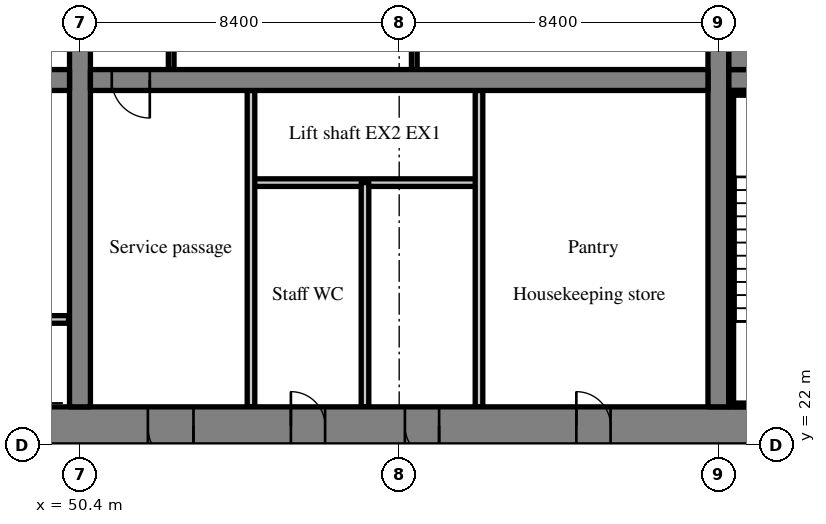
"""IFC4 building model, lengths in metres.
Left out: names, types, materials, properties, quantities, classifications, styles, units other than length and angle.
Written with IfcOpenShell. Run it as: python <this file> out.ifc"""

import sys

from ifc_helpers import new_model, si_unit, direction, frame, frame_2d, origin, place, context, subcontext, project, spatial, rectangle, extrude, source, transform, mapped, element, fill, save


model = new_model("IFC4")
c1 = context("Model", 3, precision=1e-05, world=origin(), true_north=direction((0.0, 1.0)))
c2 = subcontext(c1, "Body", "Model", "MODEL_VIEW")
j1 = project(units=[si_unit("LENGTHUNIT", "METRE"), si_unit("PLANEANGLEUNIT", "RADIAN")], contexts=[c1])
p1 = place(None, origin())
s1 = spatial("IfcSite", under=j1, at=p1, CompositionType="ELEMENT")
p2 = place(p1, origin())
s2 = spatial("IfcBuilding", under=s1, at=p2, CompositionType="ELEMENT")
p3 = place(p2, frame((0.0, 0.0, 50.6)))
s3 = spatial("IfcBuildingStorey", under=s2, at=p3, CompositionType="ELEMENT", Elevation=50.6)
m1 = source(origin(), c2, "Body", "SweptSolid", [
    extrude(rectangle(XDim=50.4, YDim=1.0, at=frame_2d((25.2, 0.0))), origin(), (0.0, 0.0, 1.0), 3.52),
])
p4 = place(p3, frame((25.2, 22.5, 0.0), z_axis=(0.0, 0.0, 1.0), x_axis=(1.0, 0.0, 0.0)))
e1 = element("IfcWall", 1, at=p4, inside=s3, PredefinedType="SHEAR", context=c2, shape_type="MappedRepresentation", body=[
    mapped(m1, transform((0.0, 0.0, 0.0), scale=1.0)),
])
m2 = source(origin(), c2, "Body", "SweptSolid", [
    extrude(rectangle(XDim=1.8, YDim=2.1, at=frame_2d((0.9, 1.05))), frame((0.0, 0.51, 0.0), z_axis=(0.0, -1.0, 0.0), x_axis=(1.0, 0.0, 0.0)), (0.0, 0.0, 1.0), 1.02),
])
p5 = place(p4, frame((15.9, 0.0, 0.0)))
e2 = element("IfcOpeningElement", 2, at=p5, cuts=e1, PredefinedType="OPENING", context=c2, shape_type="MappedRepresentation", body=[
    mapped(m2, transform((0.0, 0.0, 0.0), scale=1.0)),
])
m3 = source(origin(), c2, "Body", "SweptSolid", [
    extrude(rectangle(XDim=1.2, YDim=2.1, at=frame_2d((0.6, 1.05))), frame((0.0, 0.51, 0.0), z_axis=(0.0, -1.0, 0.0), x_axis=(1.0, 0.0, 0.0)), (0.0, 0.0, 1.0), 1.02),
])
p6 = place(p4, frame((26.987, 0.0, 0.0)))
e3 = element("IfcOpeningElement", 3, at=p6, cuts=e1, PredefinedType="OPENING", context=c2, shape_type="MappedRepresentation", body=[
    mapped(m3, transform((0.0, 0.0, 0.0), scale=1.0)),
])
m4 = source(origin(), c2, "Body", "SweptSolid", [
    extrude(rectangle(XDim=0.9, YDim=2.1, at=frame_2d((0.45, 1.05))), frame((0.0, 0.51, 0.0), z_axis=(0.0, -1.0, 0.0), x_axis=(1.0, 0.0, 0.0)), (0.0, 0.0, 1.0), 1.02),
])
p7 = place(p4, frame((33.75, 0.0, 0.0)))
e4 = element("IfcOpeningElement", 4, at=p7, cuts=e1, PredefinedType="OPENING", context=c2, shape_type="MappedRepresentation", body=[
    mapped(m4, transform((0.0, 0.0, 0.0), scale=1.0)),
])
p8 = place(p4, frame((30.75, 0.0, 0.0)))
e5 = element("IfcOpeningElement", 5, at=p8, cuts=e1, PredefinedType="OPENING", context=c2, shape_type="MappedRepresentation", body=[
    mapped(m4, transform((0.0, 0.0, 0.0), scale=1.0)),
])
p9 = place(p4, frame((38.262, 0.0, 0.0)))
e6 = element("IfcOpeningElement", 6, at=p9, cuts=e1, PredefinedType="OPENING", context=c2, shape_type="MappedRepresentation", body=[
    mapped(m4, transform((0.0, 0.0, 0.0), scale=1.0)),
])
p10 = place(p4, frame((6.438, 0.0, 0.0)))
e7 = element("IfcOpeningElement", 7, at=p10, cuts=e1, PredefinedType="OPENING", context=c2, shape_type="MappedRepresentation", body=[
    mapped(m3, transform((0.0, 0.0, 0.0), scale=1.0)),
])
p11 = place(p4, frame((47.725, 0.0, 0.0)))
e8 = element("IfcOpeningElement", 8, at=p11, cuts=e1, PredefinedType="OPENING", context=c2, shape_type="MappedRepresentation", body=[
    mapped(m3, transform((0.0, 0.0, 0.0), scale=1.0)),
])
m5 = source(origin(), c2, "Body", "SweptSolid", [
    extrude(rectangle(XDim=18.0, YDim=0.55, at=frame_2d((9.0, 0.0))), origin(), (0.0, 0.0, 1.0), 3.52),
])
p12 = place(p3, frame((50.4, 23.0, 0.0), z_axis=(0.0, 0.0, 1.0), x_axis=(0.0, 1.0, 0.0)))
e9 = element("IfcWall", 9, at=p12, inside=s3, PredefinedType="SHEAR", context=c2, shape_type="MappedRepresentation", body=[
    mapped(m5, transform((0.0, 0.0, 0.0), scale=1.0)),
])
m6 = source(origin(), c2, "Body", "SweptSolid", [
    extrude(rectangle(XDim=1.1, YDim=2.1, at=frame_2d((0.55, 1.05))), frame((0.0, 0.285, 0.0), z_axis=(0.0, -1.0, 0.0), x_axis=(1.0, 0.0, 0.0)), (0.0, 0.0, 1.0), 0.57),
])
p13 = place(p12, frame((12.45, 0.0, 0.0)))
e10 = element("IfcOpeningElement", 10, at=p13, cuts=e9, PredefinedType="OPENING", context=c2, shape_type="MappedRepresentation", body=[
    mapped(m6, transform((0.0, 0.0, 0.0), scale=1.0)),
])
p14 = place(p3, frame((67.2, 23.0, 0.0), z_axis=(0.0, 0.0, 1.0), x_axis=(0.0, 1.0, 0.0)))
e11 = element("IfcWall", 11, at=p14, inside=s3, PredefinedType="SHEAR", context=c2, shape_type="MappedRepresentation", body=[
    mapped(m5, transform((0.0, 0.0, 0.0), scale=1.0)),
])
m7 = source(origin(), c2, "Body", "SweptSolid", [
    extrude(rectangle(XDim=16.25, YDim=0.55, at=frame_2d((8.125, 0.0))), origin(), (0.0, 0.0, 1.0), 3.52),
])
p15 = place(p3, frame((33.875, 31.6, 0.0), z_axis=(0.0, 0.0, 1.0), x_axis=(1.0, 0.0, 0.0)))
e12 = element("IfcWall", 12, at=p15, inside=s3, PredefinedType="SHEAR", context=c2, shape_type="MappedRepresentation", body=[
    mapped(m7, transform((0.0, 0.0, 0.0), scale=1.0)),
])
m8 = source(origin(), c2, "Body", "SweptSolid", [
    extrude(rectangle(XDim=1.0, YDim=2.1, at=frame_2d((0.5, 1.05))), frame((0.0, 0.285, 0.0), z_axis=(0.0, -1.0, 0.0), x_axis=(1.0, 0.0, 0.0)), (0.0, 0.0, 1.0), 0.57),
])
p16 = place(p15, frame((14.687, 0.0, 0.0)))
e13 = element("IfcOpeningElement", 13, at=p16, cuts=e12, PredefinedType="OPENING", context=c2, shape_type="MappedRepresentation", body=[
    mapped(m8, transform((0.0, 0.0, 0.0), scale=1.0)),
])
p17 = place(p3, frame((50.675, 31.6, 0.0), z_axis=(0.0, 0.0, 1.0), x_axis=(1.0, 0.0, 0.0)))
e14 = element("IfcWall", 14, at=p17, inside=s3, PredefinedType="SHEAR", context=c2, shape_type="MappedRepresentation", body=[
    mapped(m7, transform((0.0, 0.0, 0.0), scale=1.0)),
])
p18 = place(p17, frame((0.562, 0.0, 0.0)))
e15 = element("IfcOpeningElement", 15, at=p18, cuts=e14, PredefinedType="OPENING", context=c2, shape_type="MappedRepresentation", body=[
    mapped(m8, transform((0.0, 0.0, 0.0), scale=1.0)),
])
m9 = source(origin(), c2, "Body", "SweptSolid", [
    extrude(rectangle(XDim=7.125, YDim=0.55, at=frame_2d((3.562, 0.0))), origin(), (0.0, 0.0, 1.0), 3.52),
])
p19 = place(p3, frame((67.475, 31.6, 0.0), z_axis=(0.0, 0.0, 1.0), x_axis=(1.0, 0.0, 0.0)))
e16 = element("IfcWall", 16, at=p19, inside=s3, PredefinedType="SHEAR", context=c2, shape_type="MappedRepresentation", body=[
    mapped(m9, transform((0.0, 0.0, 0.0), scale=1.0)),
])
p20 = place(p19, frame((5.5, 0.0, 0.0)))
e17 = element("IfcOpeningElement", 17, at=p20, cuts=e16, PredefinedType="OPENING", context=c2, shape_type="MappedRepresentation", body=[
    mapped(m6, transform((0.0, 0.0, 0.0), scale=1.0)),
])
m10 = source(origin(), c2, "Body", "SweptSolid", [
    extrude(rectangle(XDim=6.0, YDim=0.2, at=frame_2d((3.0, 0.0))), origin(), (0.0, 0.0, 1.0), 3.52),
])
p21 = place(p3, frame((44.1, 25.3, 0.0), z_axis=(0.0, 0.0, 1.0), x_axis=(1.0, 0.0, 0.0)))
e18 = element("IfcWall", 18, at=p21, inside=s3, PredefinedType="SOLIDWALL", context=c2, shape_type="MappedRepresentation", body=[
    mapped(m10, transform((0.0, 0.0, 0.0), scale=1.0)),
])
m11 = source(origin(), c2, "Body", "SweptSolid", [
    extrude(rectangle(XDim=1.1, YDim=2.1, at=frame_2d((0.55, 1.05))), frame((0.0, 0.11, 0.0), z_axis=(0.0, -1.0, 0.0), x_axis=(1.0, 0.0, 0.0)), (0.0, 0.0, 1.0), 0.22),
])
p22 = place(p21, frame((0.95, 0.0, 0.0)))
e19 = element("IfcOpeningElement", 19, at=p22, cuts=e18, PredefinedType="OPENING", context=c2, shape_type="MappedRepresentation", body=[
    mapped(m11, transform((0.0, 0.0, 0.0), scale=1.0)),
])
p23 = place(p21, frame((3.95, 0.0, 0.0)))
e20 = element("IfcOpeningElement", 20, at=p23, cuts=e18, PredefinedType="OPENING", context=c2, shape_type="MappedRepresentation", body=[
    mapped(m11, transform((0.0, 0.0, 0.0), scale=1.0)),
])
p24 = place(p3, frame((60.9, 28.9, 0.0), z_axis=(0.0, 0.0, 1.0), x_axis=(-1.0, 0.0, 0.0)))
e21 = element("IfcWall", 21, at=p24, inside=s3, PredefinedType="SOLIDWALL", context=c2, shape_type="MappedRepresentation", body=[
    mapped(m10, transform((0.0, 0.0, 0.0), scale=1.0)),
])
m12 = source(origin(), c2, "Body", "SweptSolid", [
    extrude(rectangle(XDim=8.325, YDim=0.2, at=frame_2d((4.163, 0.0))), origin(), (0.0, 0.0, 1.0), 3.52),
])
for number, where, z_axis, x_axis in (
    (22, (54.9, 23.0, 0.0), (0.0, 0.0, 1.0), (0.0, 1.0, 0.0)),
    (23, (60.9, 23.0, 0.0), (0.0, 0.0, 1.0), (0.0, 1.0, 0.0)),
):
    element("IfcWall", number, at=place(p3, frame(where, z_axis=z_axis, x_axis=x_axis)), inside=s3, PredefinedType="PARTITIONING", context=c2, shape_type="MappedRepresentation", body=[
        mapped(m12, transform((0.0, 0.0, 0.0), scale=1.0)),
    ])
m13 = source(origin(), c2, "Body", "SweptSolid", [
    extrude(rectangle(XDim=5.9, YDim=0.2, at=frame_2d((2.95, 0.0))), origin(), (0.0, 0.0, 1.0), 3.52),
])
p25 = place(p3, frame((57.9, 23.0, 0.0), z_axis=(0.0, 0.0, 1.0), x_axis=(0.0, 1.0, 0.0)))
e24 = element("IfcWall", 24, at=p25, inside=s3, PredefinedType="PARTITIONING", context=c2, shape_type="MappedRepresentation", body=[
    mapped(m13, transform((0.0, 0.0, 0.0), scale=1.0)),
])
m14 = source(origin(), c2, "Body", "SweptSolid", [
    extrude(rectangle(XDim=3.125, YDim=0.15, at=frame_2d((1.562, 0.0))), origin(), (0.0, 0.0, 1.0), 3.52),
])
for number, where, z_axis, x_axis in (
    (25, (52.8, 31.875, 0.0), (0.0, 0.0, 1.0), (0.0, 1.0, 0.0)),
    (26, (59.197, 31.875, 0.0), (0.0, 0.0, 1.0), (0.0, 1.0, 0.0)),
):
    element("IfcWall", number, at=place(p3, frame(where, z_axis=z_axis, x_axis=x_axis)), inside=s3, PredefinedType="PARTITIONING", context=c2, shape_type="MappedRepresentation", body=[
        mapped(m14, transform((0.0, 0.0, 0.0), scale=1.0)),
    ])
m15 = source(origin(), c2, "Body", "SweptSolid", [
    extrude(rectangle(XDim=4.775, YDim=0.1, at=frame_2d((2.387, 0.0))), origin(), (0.0, 0.0, 1.0), 3.52),
])
p26 = place(p3, frame((67.475, 23.05, 0.0), z_axis=(0.0, 0.0, 1.0), x_axis=(1.0, 0.0, 0.0)))
e27 = element("IfcWall", 27, at=p26, inside=s3, PredefinedType="SOLIDWALL", context=c2, shape_type="MappedRepresentation", body=[
    mapped(m15, transform((0.0, 0.0, 0.0), scale=1.0)),
])
m16 = source(origin(), c2, "Body", "SweptSolid", [
    extrude(rectangle(XDim=4.775, YDim=0.125, at=frame_2d((2.387, 0.0))), origin(), (0.0, 0.0, 1.0), 3.52),
])
p27 = place(p3, frame((67.475, 31.262, 0.0), z_axis=(0.0, 0.0, 1.0), x_axis=(1.0, 0.0, 0.0)))
e28 = element("IfcWall", 28, at=p27, inside=s3, PredefinedType="SOLIDWALL", context=c2, shape_type="MappedRepresentation", body=[
    mapped(m16, transform((0.0, 0.0, 0.0), scale=1.0)),
])
m17 = source(origin(), c2, "Body", "SweptSolid", [
    extrude(rectangle(XDim=8.1, YDim=0.125, at=frame_2d((4.05, 0.0))), origin(), (0.0, 0.0, 1.0), 3.52),
])
p28 = place(p3, frame((67.537, 23.1, 0.0), z_axis=(0.0, 0.0, 1.0), x_axis=(0.0, 1.0, 0.0)))
e29 = element("IfcWall", 29, at=p28, inside=s3, PredefinedType="SOLIDWALL", context=c2, shape_type="MappedRepresentation", body=[
    mapped(m17, transform((0.0, 0.0, 0.0), scale=1.0)),
])
m18 = source(origin(), c2, "Body", "SweptSolid", [
    extrude(rectangle(XDim=4.775, YDim=0.925, at=frame_2d((2.387, 0.0))), origin(), (0.0, 0.0, 1.0), 3.52),
])
p29 = place(p3, frame((67.475, 32.337, 0.0), z_axis=(0.0, 0.0, 1.0), x_axis=(1.0, 0.0, 0.0)))
e30 = element("IfcWall", 30, at=p29, inside=s3, PredefinedType="SOLIDWALL", context=c2, shape_type="MappedRepresentation", body=[
    mapped(m18, transform((0.0, 0.0, 0.0), scale=1.0)),
])
m19 = source(origin(), c2, "Body", "SweptSolid", [
    extrude(rectangle(XDim=1.2, YDim=2.1, at=frame_2d((0.6, 1.05))), frame((0.0, 0.375, 0.0), z_axis=(0.0, -1.0, 0.0), x_axis=(1.0, 0.0, 0.0)), (0.0, 0.0, 1.0), 0.05),
])
p30 = place(p6, origin())
e31 = element("IfcDoor", 31, at=p30, inside=s3, OperationType="SINGLE_SWING_RIGHT", PredefinedType="DOOR", context=c2, shape_type="MappedRepresentation", body=[
    mapped(m19, transform((0.0, 0.0, 0.0), scale=1.0)),
])
fill(e3, e31)
m20 = source(origin(), c2, "Body", "SweptSolid", [
    extrude(rectangle(XDim=1.0, YDim=2.1, at=frame_2d((0.5, 1.05))), frame((0.0, 0.025, 0.0), z_axis=(0.0, -1.0, 0.0), x_axis=(1.0, 0.0, 0.0)), (0.0, 0.0, 1.0), 0.05),
])
p31 = place(p18, origin())
e32 = element("IfcDoor", 32, at=p31, inside=s3, OperationType="SINGLE_SWING_RIGHT", PredefinedType="DOOR", context=c2, shape_type="MappedRepresentation", body=[
    mapped(m20, transform((0.0, 0.0, 0.0), scale=1.0)),
])
fill(e15, e32)
m21 = source(origin(), c2, "Body", "SweptSolid", [
    extrude(rectangle(XDim=0.9, YDim=2.1, at=frame_2d((0.45, 1.05))), frame((0.0, 0.375, 0.0), z_axis=(0.0, -1.0, 0.0), x_axis=(1.0, 0.0, 0.0)), (0.0, 0.0, 1.0), 0.05),
])
p32 = place(p7, origin())
e33 = element("IfcDoor", 33, at=p32, inside=s3, OperationType="SINGLE_SWING_RIGHT", PredefinedType="DOOR", context=c2, shape_type="MappedRepresentation", body=[
    mapped(m21, transform((0.0, 0.0, 0.0), scale=1.0)),
])
fill(e4, e33)
p33 = place(p8, origin())
e34 = element("IfcDoor", 34, at=p33, inside=s3, OperationType="SINGLE_SWING_LEFT", PredefinedType="DOOR", context=c2, shape_type="MappedRepresentation", body=[
    mapped(m21, transform((0.0, 0.0, 0.0), scale=1.0)),
])
fill(e5, e34)
p34 = place(p9, origin())
e35 = element("IfcDoor", 35, at=p34, inside=s3, OperationType="SINGLE_SWING_LEFT", PredefinedType="DOOR", context=c2, shape_type="MappedRepresentation", body=[
    mapped(m21, transform((0.0, 0.0, 0.0), scale=1.0)),
])
fill(e6, e35)
save(model, sys.argv[1])
